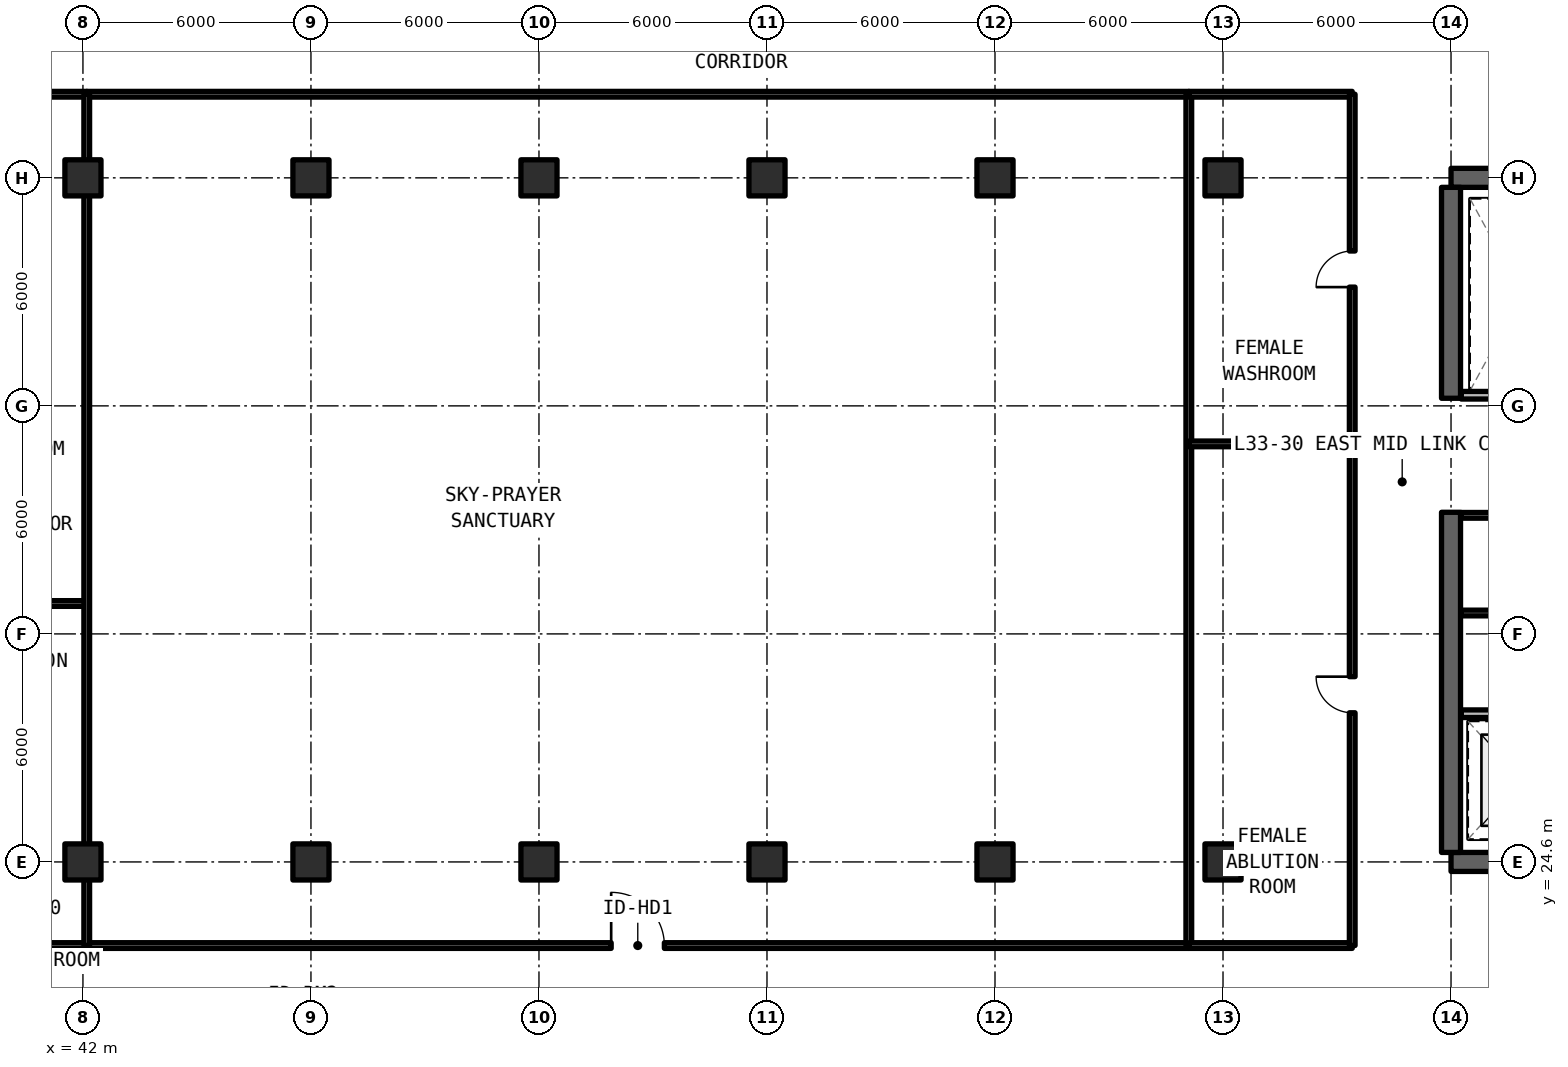
"""IFC4 building model, lengths in metres.
Left out: names, types, materials, properties, quantities, classifications, styles, units other than length and angle.
Written with IfcOpenShell. Run it as: python <this file> out.ifc"""

import sys

from ifc_helpers import new_model, si_unit, direction, frame, frame_2d, origin, origin_2d, place, context, subcontext, project, spatial, rectangle, extrude, element, fill, save


model = new_model("IFC4")
c1 = context("Model", 3, precision=1e-05, world=origin(), true_north=direction((0.0, 1.0)))
c2 = subcontext(c1, "Body", "Model", "MODEL_VIEW")
j1 = project(units=[si_unit("LENGTHUNIT", "METRE"), si_unit("PLANEANGLEUNIT", "RADIAN")], contexts=[c1])
p1 = place(None, origin())
s1 = spatial("IfcSite", under=j1, at=p1, CompositionType="ELEMENT")
p2 = place(p1, origin())
s2 = spatial("IfcBuilding", under=s1, at=p2, CompositionType="ELEMENT")
p3 = place(p2, frame((0.0, 0.0, 119.46)))
s3 = spatial("IfcBuildingStorey", under=s2, at=p3, CompositionType="ELEMENT", Elevation=119.46)
for number, where, z_axis, x_axis in (
    (1, (78.0, 24.6, 0.0), (0.0, 0.0, 1.0), (1.0, 0.0, 0.0)),
    (2, (90.0, 42.6, 0.0), (0.0, 0.0, 1.0), (-1.0, 0.0, 0.0)),
):
    element("IfcWall", number, at=place(p3, frame(where, z_axis=z_axis, x_axis=x_axis)), inside=s3, PredefinedType="SHEAR", context=c2, shape_type="SweptSolid", body=[
        extrude(rectangle(XDim=12.0, YDim=0.5, at=frame_2d((6.0, 0.0))), origin(), (0.0, 0.0, 1.0), 3.63),
    ])
p4 = place(p3, frame((78.0, 24.85, 0.0), z_axis=(0.0, 0.0, 1.0), x_axis=(0.0, 1.0, 0.0)))
e3 = element("IfcWall", 3, at=p4, inside=s3, PredefinedType="SHEAR", context=c2, shape_type="SweptSolid", body=[
    extrude(rectangle(XDim=8.95, YDim=0.5, at=frame_2d((4.475, 0.0))), origin(), (0.0, 0.0, 1.0), 3.63),
])
p5 = place(p3, frame((78.0, 36.8, 0.0), z_axis=(0.0, 0.0, 1.0), x_axis=(0.0, 1.0, 0.0)))
e4 = element("IfcWall", 4, at=p5, inside=s3, PredefinedType="SHEAR", context=c2, shape_type="SweptSolid", body=[
    extrude(rectangle(XDim=5.55, YDim=0.5, at=frame_2d((2.775, 0.0))), origin(), (0.0, 0.0, 1.0), 3.63),
])
for number, where, z_axis, x_axis in (
    (5, (42.0, 24.6, 0.0), (0.0, 0.0, 1.0), (1.0, 0.0, 0.0)),
    (6, (42.0, 42.6, 0.0), (0.0, 0.0, 1.0), (1.0, 0.0, 0.0)),
    (7, (48.0, 24.6, 0.0), (0.0, 0.0, 1.0), (1.0, 0.0, 0.0)),
    (8, (48.0, 42.6, 0.0), (0.0, 0.0, 1.0), (1.0, 0.0, 0.0)),
    (9, (54.0, 24.6, 0.0), (0.0, 0.0, 1.0), (1.0, 0.0, 0.0)),
    (10, (54.0, 42.6, 0.0), (0.0, 0.0, 1.0), (1.0, 0.0, 0.0)),
    (11, (60.0, 24.6, 0.0), (0.0, 0.0, 1.0), (1.0, 0.0, 0.0)),
    (12, (60.0, 42.6, 0.0), (0.0, 0.0, 1.0), (1.0, 0.0, 0.0)),
    (13, (66.0, 24.6, 0.0), (0.0, 0.0, 1.0), (1.0, 0.0, 0.0)),
    (14, (66.0, 42.6, 0.0), (0.0, 0.0, 1.0), (1.0, 0.0, 0.0)),
    (15, (72.0, 24.6, 0.0), (0.0, 0.0, 1.0), (1.0, 0.0, 0.0)),
    (16, (72.0, 42.6, 0.0), (0.0, 0.0, 1.0), (1.0, 0.0, 0.0)),
):
    element("IfcColumn", number, at=place(p3, frame(where, z_axis=z_axis, x_axis=x_axis)), inside=s3, PredefinedType="COLUMN", context=c2, shape_type="SweptSolid", body=[
        extrude(rectangle(XDim=0.95, YDim=0.95, at=origin_2d()), origin(), (0.0, 0.0, 1.0), 3.63),
    ])
p6 = place(p3, frame((78.27, 28.5, 0.0), z_axis=(0.0, 0.0, 1.0), x_axis=(1.0, 0.0, 0.0)))
e17 = element("IfcWall", 17, at=p6, inside=s3, PredefinedType="SOLIDWALL", context=c2, shape_type="SweptSolid", body=[
    extrude(rectangle(XDim=7.51, YDim=0.2, at=frame_2d((3.755, 0.0))), origin(), (0.0, 0.0, 1.0), 2.57),
])
p7 = place(p6, frame((3.53, 0.0, 0.0)))
e18 = element("IfcOpeningElement", 18, at=p7, cuts=e17, PredefinedType="OPENING", context=c2, shape_type="SweptSolid", body=[
    extrude(rectangle(XDim=1.0, YDim=2.15, at=frame_2d((0.5, 1.075))), frame((0.0, 0.11, 0.0), z_axis=(0.0, -1.0, 0.0), x_axis=(1.0, 0.0, 0.0)), (0.0, 0.0, 1.0), 0.22),
])
for number, where, z_axis, x_axis in (
    (19, (78.27, 31.15, 0.0), (0.0, 0.0, 1.0), (1.0, 0.0, 0.0)),
    (20, (78.27, 33.72, 0.0), (0.0, 0.0, 1.0), (1.0, 0.0, 0.0)),
):
    element("IfcWall", number, at=place(p3, frame(where, z_axis=z_axis, x_axis=x_axis)), inside=s3, PredefinedType="SOLIDWALL", context=c2, shape_type="SweptSolid", body=[
        extrude(rectangle(XDim=3.05, YDim=0.15, at=frame_2d((1.525, 0.0))), origin(), (0.0, 0.0, 1.0), 2.57),
    ])
p8 = place(p3, frame((78.27, 36.88, 0.0), z_axis=(0.0, 0.0, 1.0), x_axis=(1.0, 0.0, 0.0)))
e21 = element("IfcWall", 21, at=p8, inside=s3, PredefinedType="SOLIDWALL", context=c2, shape_type="SweptSolid", body=[
    extrude(rectangle(XDim=3.05, YDim=0.2, at=frame_2d((1.525, 0.0))), origin(), (0.0, 0.0, 1.0), 2.57),
])
for number, where, z_axis, x_axis in (
    (22, (38.6, 22.4, 0.0), (0.0, 0.0, 1.0), (1.0, 0.0, 0.0)),
    (23, (38.6, 31.4, 0.0), (0.0, 0.0, 1.0), (1.0, 0.0, 0.0)),
    (24, (38.6, 44.8, 0.0), (0.0, 0.0, 1.0), (1.0, 0.0, 0.0)),
):
    element("IfcWall", number, at=place(p3, frame(where, z_axis=z_axis, x_axis=x_axis)), inside=s3, PredefinedType="SOLIDWALL", context=c2, shape_type="SweptSolid", body=[
        extrude(rectangle(XDim=3.5, YDim=0.15, at=frame_2d((1.75, 0.0))), origin(), (0.0, 0.0, 1.0), 2.57),
    ])
p9 = place(p3, frame((42.1, 22.4, 0.0), z_axis=(0.0, 0.0, 1.0), x_axis=(1.0, 0.0, 0.0)))
e25 = element("IfcWall", 25, at=p9, inside=s3, PredefinedType="SOLIDWALL", context=c2, shape_type="SweptSolid", body=[
    extrude(rectangle(XDim=29.0, YDim=0.15, at=frame_2d((14.5, 0.0))), origin(), (0.0, 0.0, 1.0), 2.57),
])
p10 = place(p9, frame((13.8, 0.0, 0.0)))
e26 = element("IfcOpeningElement", 26, at=p10, cuts=e25, PredefinedType="OPENING", context=c2, shape_type="SweptSolid", body=[
    extrude(rectangle(XDim=1.4, YDim=2.15, at=frame_2d((0.7, 1.075))), frame((0.0, 0.085, 0.0), z_axis=(0.0, -1.0, 0.0), x_axis=(1.0, 0.0, 0.0)), (0.0, 0.0, 1.0), 0.17),
])
p11 = place(p3, frame((42.1, 44.8, 0.0), z_axis=(0.0, 0.0, 1.0), x_axis=(1.0, 0.0, 0.0)))
e27 = element("IfcWall", 27, at=p11, inside=s3, PredefinedType="SOLIDWALL", context=c2, shape_type="SweptSolid", body=[
    extrude(rectangle(XDim=29.0, YDim=0.15, at=frame_2d((14.5, 0.0))), origin(), (0.0, 0.0, 1.0), 2.57),
])
for number, where, z_axis, x_axis in (
    (28, (42.1, 22.4, 0.0), (0.0, 0.0, 1.0), (0.0, 1.0, 0.0)),
    (29, (71.1, 22.4, 0.0), (0.0, 0.0, 1.0), (0.0, 1.0, 0.0)),
):
    element("IfcWall", number, at=place(p3, frame(where, z_axis=z_axis, x_axis=x_axis)), inside=s3, PredefinedType="SOLIDWALL", context=c2, shape_type="SweptSolid", body=[
        extrude(rectangle(XDim=22.4, YDim=0.15, at=frame_2d((11.2, 0.0))), origin(), (0.0, 0.0, 1.0), 2.57),
    ])
for number, where, z_axis, x_axis in (
    (30, (71.1, 22.4, 0.0), (0.0, 0.0, 1.0), (1.0, 0.0, 0.0)),
    (31, (71.1, 35.6, 0.0), (0.0, 0.0, 1.0), (1.0, 0.0, 0.0)),
):
    element("IfcWall", number, at=place(p3, frame(where, z_axis=z_axis, x_axis=x_axis)), inside=s3, PredefinedType="SOLIDWALL", context=c2, shape_type="SweptSolid", body=[
        extrude(rectangle(XDim=4.3, YDim=0.15, at=frame_2d((2.15, 0.0))), origin(), (0.0, 0.0, 1.0), 2.57),
    ])
p12 = place(p3, frame((75.4, 22.4, 0.0), z_axis=(0.0, 0.0, 1.0), x_axis=(0.0, 1.0, 0.0)))
e32 = element("IfcWall", 32, at=p12, inside=s3, PredefinedType="SOLIDWALL", context=c2, shape_type="SweptSolid", body=[
    extrude(rectangle(XDim=13.2, YDim=0.15, at=frame_2d((6.6, 0.0))), origin(), (0.0, 0.0, 1.0), 2.57),
])
p13 = place(p12, frame((6.125, 0.0, 0.0)))
e33 = element("IfcOpeningElement", 33, at=p13, cuts=e32, PredefinedType="OPENING", context=c2, shape_type="SweptSolid", body=[
    extrude(rectangle(XDim=0.95, YDim=2.15, at=frame_2d((0.475, 1.075))), frame((0.0, 0.085, 0.0), z_axis=(0.0, -1.0, 0.0), x_axis=(1.0, 0.0, 0.0)), (0.0, 0.0, 1.0), 0.17),
])
p14 = place(p3, frame((71.1, 44.8, 0.0), z_axis=(0.0, 0.0, 1.0), x_axis=(1.0, 0.0, 0.0)))
e34 = element("IfcWall", 34, at=p14, inside=s3, PredefinedType="SOLIDWALL", context=c2, shape_type="SweptSolid", body=[
    extrude(rectangle(XDim=4.3, YDim=0.15, at=frame_2d((2.15, 0.0))), origin(), (0.0, 0.0, 1.0), 2.57),
])
p15 = place(p3, frame((75.4, 35.6, 0.0), z_axis=(0.0, 0.0, 1.0), x_axis=(0.0, 1.0, 0.0)))
e35 = element("IfcWall", 35, at=p15, inside=s3, PredefinedType="SOLIDWALL", context=c2, shape_type="SweptSolid", body=[
    extrude(rectangle(XDim=9.2, YDim=0.15, at=frame_2d((4.6, 0.0))), origin(), (0.0, 0.0, 1.0), 2.57),
])
p16 = place(p15, frame((4.125, 0.0, 0.0)))
e36 = element("IfcOpeningElement", 36, at=p16, cuts=e35, PredefinedType="OPENING", context=c2, shape_type="SweptSolid", body=[
    extrude(rectangle(XDim=0.95, YDim=2.15, at=frame_2d((0.475, 1.075))), frame((0.0, 0.085, 0.0), z_axis=(0.0, -1.0, 0.0), x_axis=(1.0, 0.0, 0.0)), (0.0, 0.0, 1.0), 0.17),
])
p17 = place(p10, origin())
e37 = element("IfcDoor", 37, at=p17, inside=s3, OperationType="SINGLE_SWING_LEFT", PredefinedType="DOOR", context=c2, shape_type="SweptSolid", body=[
    extrude(rectangle(XDim=1.4, YDim=2.15, at=frame_2d((0.7, 1.075))), frame((0.0, 0.025, 0.0), z_axis=(0.0, -1.0, 0.0), x_axis=(1.0, 0.0, 0.0)), (0.0, 0.0, 1.0), 0.05),
])
fill(e26, e37)
p18 = place(p13, origin())
e38 = element("IfcDoor", 38, at=p18, inside=s3, OperationType="SINGLE_SWING_RIGHT", PredefinedType="DOOR", context=c2, shape_type="SweptSolid", body=[
    extrude(rectangle(XDim=0.95, YDim=2.15, at=frame_2d((0.475, 1.075))), frame((0.0, 0.025, 0.0), z_axis=(0.0, -1.0, 0.0), x_axis=(1.0, 0.0, 0.0)), (0.0, 0.0, 1.0), 0.05),
])
fill(e33, e38)
p19 = place(p16, origin())
e39 = element("IfcDoor", 39, at=p19, inside=s3, OperationType="SINGLE_SWING_LEFT", PredefinedType="DOOR", context=c2, shape_type="SweptSolid", body=[
    extrude(rectangle(XDim=0.95, YDim=2.15, at=frame_2d((0.475, 1.075))), frame((0.0, 0.025, 0.0), z_axis=(0.0, -1.0, 0.0), x_axis=(1.0, 0.0, 0.0)), (0.0, 0.0, 1.0), 0.05),
])
fill(e36, e39)
save(model, sys.argv[1])
